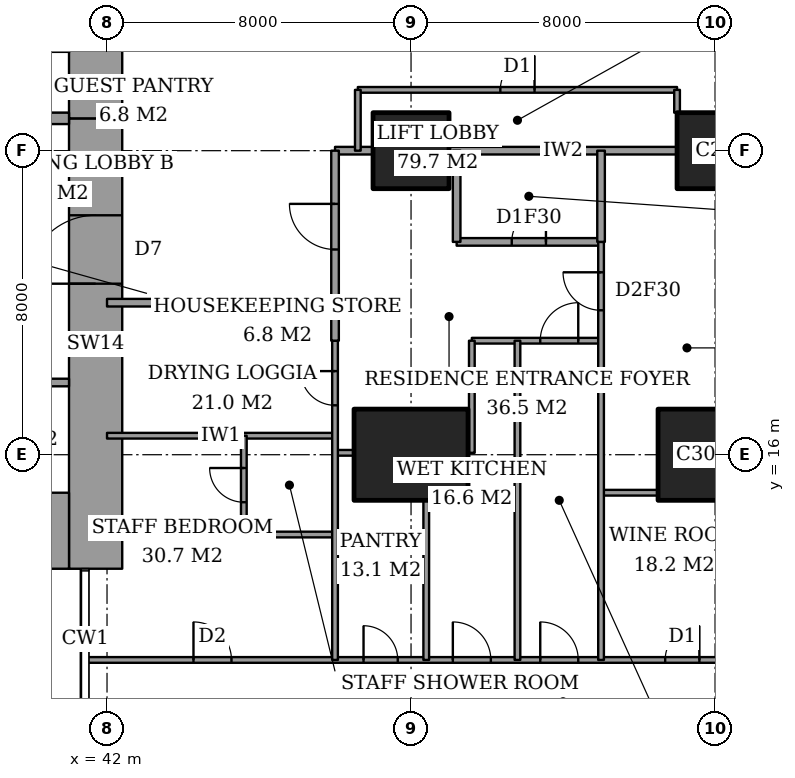
"""IFC4 building model, lengths in metres.
Left out: names, types, materials, properties, quantities, classifications, styles, units other than length and angle.
Written with IfcOpenShell. Run it as: python <this file> out.ifc"""

import sys

from ifc_helpers import new_model, si_unit, direction, frame, frame_2d, origin, origin_2d, place, context, subcontext, project, spatial, rectangle, extrude, element, fill, save


model = new_model("IFC4")
c1 = context("Model", 3, precision=1e-05, world=origin(), true_north=direction((0.0, 1.0)))
c2 = subcontext(c1, "Body", "Model", "MODEL_VIEW")
j1 = project(units=[si_unit("LENGTHUNIT", "METRE"), si_unit("PLANEANGLEUNIT", "RADIAN")], contexts=[c1])
p1 = place(None, origin())
s1 = spatial("IfcSite", under=j1, at=p1, CompositionType="ELEMENT")
p2 = place(p1, origin())
s2 = spatial("IfcBuilding", under=s1, at=p2, CompositionType="ELEMENT")
p3 = place(p2, frame((0.0, 0.0, 139.4)))
s3 = spatial("IfcBuildingStorey", under=s2, at=p3, CompositionType="ELEMENT", Elevation=139.4)
p4 = place(p3, frame((50.0, 16.0, 0.0), z_axis=(0.0, 0.0, 1.0), x_axis=(1.0, 0.0, 0.0)))
e1 = element("IfcColumn", 1, at=p4, inside=s3, PredefinedType="COLUMN", context=c2, shape_type="SweptSolid", body=[
    extrude(rectangle(XDim=3.0, YDim=2.4, at=origin_2d()), origin(), (0.0, 0.0, 1.0), 3.6),
])
p5 = place(p3, frame((50.0, 24.0, 0.0), z_axis=(0.0, 0.0, 1.0), x_axis=(1.0, 0.0, 0.0)))
e2 = element("IfcColumn", 2, at=p5, inside=s3, PredefinedType="COLUMN", context=c2, shape_type="SweptSolid", body=[
    extrude(rectangle(XDim=2.0, YDim=2.0, at=origin_2d()), origin(), (0.0, 0.0, 1.0), 3.6),
])
p6 = place(p3, frame((58.0, 16.0, 0.0), z_axis=(0.0, 0.0, 1.0), x_axis=(1.0, 0.0, 0.0)))
e3 = element("IfcColumn", 3, at=p6, inside=s3, PredefinedType="COLUMN", context=c2, shape_type="SweptSolid", body=[
    extrude(rectangle(XDim=3.0, YDim=2.4, at=origin_2d()), origin(), (0.0, 0.0, 1.0), 3.6),
])
p7 = place(p3, frame((58.0, 24.0, 0.0), z_axis=(0.0, 0.0, 1.0), x_axis=(1.0, 0.0, 0.0)))
e4 = element("IfcColumn", 4, at=p7, inside=s3, PredefinedType="COLUMN", context=c2, shape_type="SweptSolid", body=[
    extrude(rectangle(XDim=2.0, YDim=2.0, at=origin_2d()), origin(), (0.0, 0.0, 1.0), 3.6),
])
p8 = place(p3, frame((37.85, 14.0, 0.0), z_axis=(0.0, 0.0, 1.0), x_axis=(1.0, 0.0, 0.0)))
e5 = element("IfcWall", 5, at=p8, inside=s3, PredefinedType="SHEAR", context=c2, shape_type="SweptSolid", body=[
    extrude(rectangle(XDim=3.15, YDim=2.0, at=frame_2d((1.575, 0.0))), origin(), (0.0, 0.0, 1.0), 3.6),
])
p9 = place(p3, frame((41.7, 13.0, 0.0), z_axis=(0.0, 0.0, 1.0), x_axis=(0.0, 1.0, 0.0)))
e6 = element("IfcWall", 6, at=p9, inside=s3, PredefinedType="SHEAR", context=c2, shape_type="SweptSolid", body=[
    extrude(rectangle(XDim=11.85, YDim=1.4, at=frame_2d((5.925, 0.0))), origin(), (0.0, 0.0, 1.0), 3.6),
])
p10 = place(p9, frame((7.5, 0.0, 0.0)))
e7 = element("IfcOpeningElement", 7, at=p10, cuts=e6, PredefinedType="OPENING", context=c2, shape_type="SweptSolid", body=[
    extrude(rectangle(XDim=1.8, YDim=2.4, at=frame_2d((0.9, 1.2))), frame((0.0, 0.71, 0.0), z_axis=(0.0, -1.0, 0.0), x_axis=(1.0, 0.0, 0.0)), (0.0, 0.0, 1.0), 1.42),
])
p11 = place(p3, frame((41.7, 24.85, 0.0), z_axis=(0.0, 0.0, 1.0), x_axis=(0.0, 1.0, 0.0)))
e8 = element("IfcWall", 8, at=p11, inside=s3, PredefinedType="SHEAR", context=c2, shape_type="SweptSolid", body=[
    extrude(rectangle(XDim=10.15, YDim=1.4, at=frame_2d((5.075, 0.0))), origin(), (0.0, 0.0, 1.0), 3.6),
])
p12 = place(p3, frame((37.85, 24.85, 0.0), z_axis=(0.0, 0.0, 1.0), x_axis=(1.0, 0.0, 0.0)))
e9 = element("IfcWall", 9, at=p12, inside=s3, PredefinedType="SHEAR", context=c2, shape_type="SweptSolid", body=[
    extrude(rectangle(XDim=3.15, YDim=0.3, at=frame_2d((1.575, 0.0))), origin(), (0.0, 0.0, 1.0), 3.6),
])
p13 = place(p12, frame((0.95, 0.0, 0.0)))
e10 = element("IfcOpeningElement", 10, at=p13, cuts=e9, PredefinedType="OPENING", context=c2, shape_type="SweptSolid", body=[
    extrude(rectangle(XDim=1.0, YDim=2.1, at=frame_2d((0.5, 1.05))), frame((0.0, 0.16, 0.0), z_axis=(0.0, -1.0, 0.0), x_axis=(1.0, 0.0, 0.0)), (0.0, 0.0, 1.0), 0.32),
])
p14 = place(p3, frame((41.439, 10.6, 0.0), z_axis=(0.0, 0.0, 1.0), x_axis=(1.0, 0.0, 0.0)))
e11 = element("IfcWall", 11, at=p14, inside=s3, PredefinedType="PARTITIONING", context=c2, shape_type="SweptSolid", body=[
    extrude(rectangle(XDim=25.011, YDim=0.15, at=frame_2d((12.505, 0.0))), origin(), (0.0, 0.0, 1.0), 3.35),
])
p15 = place(p14, frame((11.961, 0.0, 0.0)))
e12 = element("IfcOpeningElement", 12, at=p15, cuts=e11, PredefinedType="OPENING", context=c2, shape_type="SweptSolid", body=[
    extrude(rectangle(XDim=1.0, YDim=2.1, at=frame_2d((0.5, 1.05))), frame((0.0, 0.085, 0.0), z_axis=(0.0, -1.0, 0.0), x_axis=(1.0, 0.0, 0.0)), (0.0, 0.0, 1.0), 0.17),
])
p16 = place(p14, frame((20.924, 0.0, 0.0)))
e13 = element("IfcOpeningElement", 13, at=p16, cuts=e11, PredefinedType="OPENING", context=c2, shape_type="SweptSolid", body=[
    extrude(rectangle(XDim=1.0, YDim=2.1, at=frame_2d((0.5, 1.05))), frame((0.0, 0.085, 0.0), z_axis=(0.0, -1.0, 0.0), x_axis=(1.0, 0.0, 0.0)), (0.0, 0.0, 1.0), 0.17),
])
p17 = place(p14, frame((15.249, 0.0, 0.0)))
e14 = element("IfcOpeningElement", 14, at=p17, cuts=e11, PredefinedType="OPENING", context=c2, shape_type="SweptSolid", body=[
    extrude(rectangle(XDim=0.9, YDim=2.1, at=frame_2d((0.45, 1.05))), frame((0.0, 0.085, 0.0), z_axis=(0.0, -1.0, 0.0), x_axis=(1.0, 0.0, 0.0)), (0.0, 0.0, 1.0), 0.17),
])
p18 = place(p14, frame((9.661, 0.0, 0.0)))
e15 = element("IfcOpeningElement", 15, at=p18, cuts=e11, PredefinedType="OPENING", context=c2, shape_type="SweptSolid", body=[
    extrude(rectangle(XDim=1.0, YDim=2.1, at=frame_2d((0.5, 1.05))), frame((0.0, 0.085, 0.0), z_axis=(0.0, -1.0, 0.0), x_axis=(1.0, 0.0, 0.0)), (0.0, 0.0, 1.0), 0.17),
])
p19 = place(p14, frame((7.311, 0.0, 0.0)))
e16 = element("IfcOpeningElement", 16, at=p19, cuts=e11, PredefinedType="OPENING", context=c2, shape_type="SweptSolid", body=[
    extrude(rectangle(XDim=0.9, YDim=2.1, at=frame_2d((0.45, 1.05))), frame((0.0, 0.085, 0.0), z_axis=(0.0, -1.0, 0.0), x_axis=(1.0, 0.0, 0.0)), (0.0, 0.0, 1.0), 0.17),
])
p20 = place(p14, frame((2.836, 0.0, 0.0)))
e17 = element("IfcOpeningElement", 17, at=p20, cuts=e11, PredefinedType="OPENING", context=c2, shape_type="SweptSolid", body=[
    extrude(rectangle(XDim=1.0, YDim=2.1, at=frame_2d((0.5, 1.05))), frame((0.0, 0.085, 0.0), z_axis=(0.0, -1.0, 0.0), x_axis=(1.0, 0.0, 0.0)), (0.0, 0.0, 1.0), 0.17),
])
p21 = place(p3, frame((45.6, 13.9, 0.0), z_axis=(0.0, 0.0, 1.0), x_axis=(1.0, 0.0, 0.0)))
e18 = element("IfcWall", 18, at=p21, inside=s3, PredefinedType="PARTITIONING", context=c2, shape_type="SweptSolid", body=[
    extrude(rectangle(XDim=2.4, YDim=0.15, at=frame_2d((1.2, 0.0))), origin(), (0.0, 0.0, 1.0), 3.35),
])
p22 = place(p3, frame((55.0, 15.0, 0.0), z_axis=(0.0, 0.0, 1.0), x_axis=(1.0, 0.0, 0.0)))
e19 = element("IfcWall", 19, at=p22, inside=s3, PredefinedType="PARTITIONING", context=c2, shape_type="SweptSolid", body=[
    extrude(rectangle(XDim=1.5, YDim=0.15, at=frame_2d((0.75, 0.0))), origin(), (0.0, 0.0, 1.0), 3.35),
])
p23 = place(p3, frame((48.0, 16.05, 0.0), z_axis=(0.0, 0.0, 1.0), x_axis=(1.0, 0.0, 0.0)))
e20 = element("IfcWall", 20, at=p23, inside=s3, PredefinedType="PARTITIONING", context=c2, shape_type="SweptSolid", body=[
    extrude(rectangle(XDim=0.5, YDim=0.15, at=frame_2d((0.25, 0.0))), origin(), (0.0, 0.0, 1.0), 2.634),
])
p24 = place(p3, frame((42.0, 16.5, 0.0), z_axis=(0.0, 0.0, 1.0), x_axis=(1.0, 0.0, 0.0)))
e21 = element("IfcWall", 21, at=p24, inside=s3, PredefinedType="PARTITIONING", context=c2, shape_type="SweptSolid", body=[
    extrude(rectangle(XDim=6.0, YDim=0.15, at=frame_2d((3.0, 0.0))), origin(), (0.0, 0.0, 1.0), 3.35),
])
p25 = place(p3, frame((51.6, 19.0, 0.0), z_axis=(0.0, 0.0, 1.0), x_axis=(1.0, 0.0, 0.0)))
e22 = element("IfcWall", 22, at=p25, inside=s3, PredefinedType="PARTITIONING", context=c2, shape_type="SweptSolid", body=[
    extrude(rectangle(XDim=3.4, YDim=0.15, at=frame_2d((1.7, 0.0))), origin(), (0.0, 0.0, 1.0), 3.35),
])
p26 = place(p25, frame((1.8, 0.0, 0.0)))
e23 = element("IfcOpeningElement", 23, at=p26, cuts=e22, PredefinedType="OPENING", context=c2, shape_type="SweptSolid", body=[
    extrude(rectangle(XDim=1.0, YDim=2.1, at=frame_2d((0.5, 1.05))), frame((0.0, 0.085, 0.0), z_axis=(0.0, -1.0, 0.0), x_axis=(1.0, 0.0, 0.0)), (0.0, 0.0, 1.0), 0.17),
])
p27 = place(p3, frame((42.0, 20.0, 0.0), z_axis=(0.0, 0.0, 1.0), x_axis=(1.0, 0.0, 0.0)))
e24 = element("IfcWall", 24, at=p27, inside=s3, PredefinedType="PARTITIONING", context=c2, shape_type="SweptSolid", body=[
    extrude(rectangle(XDim=6.0, YDim=0.2, at=frame_2d((3.0, 0.0))), origin(), (0.0, 0.0, 1.0), 3.35),
])
p28 = place(p3, frame((51.2, 21.6, 0.0), z_axis=(0.0, 0.0, 1.0), x_axis=(1.0, 0.0, 0.0)))
e25 = element("IfcWall", 25, at=p28, inside=s3, PredefinedType="PARTITIONING", context=c2, shape_type="SweptSolid", body=[
    extrude(rectangle(XDim=3.8, YDim=0.2, at=frame_2d((1.9, 0.0))), origin(), (0.0, 0.0, 1.0), 3.35),
])
p29 = place(p28, frame((1.45, 0.0, 0.0)))
e26 = element("IfcOpeningElement", 26, at=p29, cuts=e25, PredefinedType="OPENING", context=c2, shape_type="SweptSolid", body=[
    extrude(rectangle(XDim=0.9, YDim=2.1, at=frame_2d((0.45, 1.05))), frame((0.0, 0.11, 0.0), z_axis=(0.0, -1.0, 0.0), x_axis=(1.0, 0.0, 0.0)), (0.0, 0.0, 1.0), 0.22),
])
p30 = place(p3, frame((48.0, 24.0, 0.0), z_axis=(0.0, 0.0, 1.0), x_axis=(1.0, 0.0, 0.0)))
e27 = element("IfcWall", 27, at=p30, inside=s3, PredefinedType="PARTITIONING", context=c2, shape_type="SweptSolid", body=[
    extrude(rectangle(XDim=1.0, YDim=0.2, at=frame_2d((0.5, 0.0))), origin(), (0.0, 0.0, 1.0), 3.35),
])
p31 = place(p3, frame((51.0, 24.0, 0.0), z_axis=(0.0, 0.0, 1.0), x_axis=(1.0, 0.0, 0.0)))
e28 = element("IfcWall", 28, at=p31, inside=s3, PredefinedType="PARTITIONING", context=c2, shape_type="SweptSolid", body=[
    extrude(rectangle(XDim=6.0, YDim=0.2, at=frame_2d((3.0, 0.0))), origin(), (0.0, 0.0, 1.0), 3.35),
])
p32 = place(p3, frame((48.6, 25.6, 0.0), z_axis=(0.0, 0.0, 1.0), x_axis=(1.0, 0.0, 0.0)))
e29 = element("IfcWall", 29, at=p32, inside=s3, PredefinedType="PARTITIONING", context=c2, shape_type="SweptSolid", body=[
    extrude(rectangle(XDim=8.4, YDim=0.15, at=frame_2d((4.2, 0.0))), origin(), (0.0, 0.0, 1.0), 3.35),
])
p33 = place(p32, frame((3.75, 0.0, 0.0)))
e30 = element("IfcOpeningElement", 30, at=p33, cuts=e29, PredefinedType="OPENING", context=c2, shape_type="SweptSolid", body=[
    extrude(rectangle(XDim=0.9, YDim=2.1, at=frame_2d((0.45, 1.05))), frame((0.0, 0.085, 0.0), z_axis=(0.0, -1.0, 0.0), x_axis=(1.0, 0.0, 0.0)), (0.0, 0.0, 1.0), 0.17),
])
p34 = place(p3, frame((45.6, 13.9, 0.0), z_axis=(0.0, 0.0, 1.0), x_axis=(0.0, 1.0, 0.0)))
e31 = element("IfcWall", 31, at=p34, inside=s3, PredefinedType="PARTITIONING", context=c2, shape_type="SweptSolid", body=[
    extrude(rectangle(XDim=2.6, YDim=0.15, at=frame_2d((1.3, 0.0))), origin(), (0.0, 0.0, 1.0), 3.35),
])
p35 = place(p34, frame((0.85, 0.0, 0.0)))
e32 = element("IfcOpeningElement", 32, at=p35, cuts=e31, PredefinedType="OPENING", context=c2, shape_type="SweptSolid", body=[
    extrude(rectangle(XDim=0.9, YDim=2.1, at=frame_2d((0.45, 1.05))), frame((0.0, 0.085, 0.0), z_axis=(0.0, -1.0, 0.0), x_axis=(1.0, 0.0, 0.0)), (0.0, 0.0, 1.0), 0.17),
])
p36 = place(p3, frame((48.0, 19.0, 0.0), z_axis=(0.0, 0.0, 1.0), x_axis=(0.0, 1.0, 0.0)))
e33 = element("IfcWall", 33, at=p36, inside=s3, PredefinedType="PARTITIONING", context=c2, shape_type="SweptSolid", body=[
    extrude(rectangle(XDim=5.0, YDim=0.2, at=frame_2d((2.5, 0.0))), origin(), (0.0, 0.0, 1.0), 3.35),
])
p37 = place(p36, frame((2.4, 0.0, 0.0)))
e34 = element("IfcOpeningElement", 34, at=p37, cuts=e33, PredefinedType="OPENING", context=c2, shape_type="SweptSolid", body=[
    extrude(rectangle(XDim=1.2, YDim=2.4, at=frame_2d((0.6, 1.2))), frame((0.0, 0.11, 0.0), z_axis=(0.0, -1.0, 0.0), x_axis=(1.0, 0.0, 0.0)), (0.0, 0.0, 1.0), 0.22),
])
p38 = place(p3, frame((48.0, 10.6, 0.0), z_axis=(0.0, 0.0, 1.0), x_axis=(0.0, 1.0, 0.0)))
e35 = element("IfcWall", 35, at=p38, inside=s3, PredefinedType="PARTITIONING", context=c2, shape_type="SweptSolid", body=[
    extrude(rectangle(XDim=8.4, YDim=0.15, at=frame_2d((4.2, 0.0))), origin(), (0.0, 0.0, 1.0), 3.35),
])
p39 = place(p38, frame((6.7, 0.0, 0.0)))
e36 = element("IfcOpeningElement", 36, at=p39, cuts=e35, PredefinedType="OPENING", context=c2, shape_type="SweptSolid", body=[
    extrude(rectangle(XDim=0.9, YDim=2.1, at=frame_2d((0.45, 1.05))), frame((0.0, 0.085, 0.0), z_axis=(0.0, -1.0, 0.0), x_axis=(1.0, 0.0, 0.0)), (0.0, 0.0, 1.0), 0.17),
])
p40 = place(p3, frame((48.6, 24.0, 0.0), z_axis=(0.0, 0.0, 1.0), x_axis=(0.0, 1.0, 0.0)))
e37 = element("IfcWall", 37, at=p40, inside=s3, PredefinedType="PARTITIONING", context=c2, shape_type="SweptSolid", body=[
    extrude(rectangle(XDim=1.6, YDim=0.15, at=frame_2d((0.8, 0.0))), origin(), (0.0, 0.0, 1.0), 3.35),
])
p41 = place(p3, frame((50.4, 10.6, 0.0), z_axis=(0.0, 0.0, 1.0), x_axis=(0.0, 1.0, 0.0)))
e38 = element("IfcWall", 38, at=p41, inside=s3, PredefinedType="PARTITIONING", context=c2, shape_type="SweptSolid", body=[
    extrude(rectangle(XDim=4.2, YDim=0.15, at=frame_2d((2.1, 0.0))), origin(), (0.0, 0.0, 1.0), 3.35),
])
p42 = place(p3, frame((51.2, 21.6, 0.0), z_axis=(0.0, 0.0, 1.0), x_axis=(0.0, 1.0, 0.0)))
e39 = element("IfcWall", 39, at=p42, inside=s3, PredefinedType="PARTITIONING", context=c2, shape_type="SweptSolid", body=[
    extrude(rectangle(XDim=2.4, YDim=0.2, at=frame_2d((1.2, 0.0))), origin(), (0.0, 0.0, 1.0), 3.35),
])
p43 = place(p3, frame((51.6, 16.05, 0.0), z_axis=(0.0, 0.0, 1.0), x_axis=(0.0, 1.0, 0.0)))
e40 = element("IfcWall", 40, at=p43, inside=s3, PredefinedType="PARTITIONING", context=c2, shape_type="SweptSolid", body=[
    extrude(rectangle(XDim=2.95, YDim=0.15, at=frame_2d((1.475, 0.0))), origin(), (0.0, 0.0, 1.0), 3.35),
])
p44 = place(p3, frame((52.8, 10.6, 0.0), z_axis=(0.0, 0.0, 1.0), x_axis=(0.0, 1.0, 0.0)))
e41 = element("IfcWall", 41, at=p44, inside=s3, PredefinedType="PARTITIONING", context=c2, shape_type="SweptSolid", body=[
    extrude(rectangle(XDim=8.4, YDim=0.15, at=frame_2d((4.2, 0.0))), origin(), (0.0, 0.0, 1.0), 3.35),
])
p45 = place(p3, frame((55.0, 21.6, 0.0), z_axis=(0.0, 0.0, 1.0), x_axis=(0.0, 1.0, 0.0)))
e42 = element("IfcWall", 42, at=p45, inside=s3, PredefinedType="PARTITIONING", context=c2, shape_type="SweptSolid", body=[
    extrude(rectangle(XDim=2.4, YDim=0.2, at=frame_2d((1.2, 0.0))), origin(), (0.0, 0.0, 1.0), 3.35),
])
p46 = place(p3, frame((55.0, 10.6, 0.0), z_axis=(0.0, 0.0, 1.0), x_axis=(0.0, 1.0, 0.0)))
e43 = element("IfcWall", 43, at=p46, inside=s3, PredefinedType="PARTITIONING", context=c2, shape_type="SweptSolid", body=[
    extrude(rectangle(XDim=11.0, YDim=0.15, at=frame_2d((5.5, 0.0))), origin(), (0.0, 0.0, 1.0), 3.35),
])
p47 = place(p46, frame((9.2, 0.0, 0.0)))
e44 = element("IfcOpeningElement", 44, at=p47, cuts=e43, PredefinedType="OPENING", context=c2, shape_type="SweptSolid", body=[
    extrude(rectangle(XDim=1.0, YDim=2.1, at=frame_2d((0.5, 1.05))), frame((0.0, 0.085, 0.0), z_axis=(0.0, -1.0, 0.0), x_axis=(1.0, 0.0, 0.0)), (0.0, 0.0, 1.0), 0.17),
])
p48 = place(p3, frame((57.0, 25.0, 0.0), z_axis=(0.0, 0.0, 1.0), x_axis=(0.0, 1.0, 0.0)))
e45 = element("IfcWall", 45, at=p48, inside=s3, PredefinedType="PARTITIONING", context=c2, shape_type="SweptSolid", body=[
    extrude(rectangle(XDim=0.6, YDim=0.15, at=frame_2d((0.3, 0.0))), origin(), (0.0, 0.0, 1.0), 3.35),
])
p49 = place(p3, frame((28.3, 17.9, 0.0), z_axis=(0.0, 0.0, 1.0), x_axis=(1.0, 0.0, 0.0)))
e46 = element("IfcWall", 46, at=p49, inside=s3, PredefinedType="PARTITIONING", context=c2, shape_type="SweptSolid", body=[
    extrude(rectangle(XDim=12.7, YDim=0.2, at=frame_2d((6.35, 0.0))), origin(), (0.0, 0.0, 1.0), 3.6),
])
p50 = place(p49, frame((0.95, 0.0, 0.0)))
e47 = element("IfcOpeningElement", 47, at=p50, cuts=e46, PredefinedType="OPENING", context=c2, shape_type="SweptSolid", body=[
    extrude(rectangle(XDim=1.1, YDim=2.1, at=frame_2d((0.55, 1.05))), frame((0.0, 0.11, 0.0), z_axis=(0.0, -1.0, 0.0), x_axis=(1.0, 0.0, 0.0)), (0.0, 0.0, 1.0), 0.22),
])
p51 = place(p49, frame((4.15, 0.0, 0.0)))
e48 = element("IfcOpeningElement", 48, at=p51, cuts=e46, PredefinedType="OPENING", context=c2, shape_type="SweptSolid", body=[
    extrude(rectangle(XDim=1.1, YDim=2.1, at=frame_2d((0.55, 1.05))), frame((0.0, 0.11, 0.0), z_axis=(0.0, -1.0, 0.0), x_axis=(1.0, 0.0, 0.0)), (0.0, 0.0, 1.0), 0.22),
])
p52 = place(p49, frame((7.35, 0.0, 0.0)))
e49 = element("IfcOpeningElement", 49, at=p52, cuts=e46, PredefinedType="OPENING", context=c2, shape_type="SweptSolid", body=[
    extrude(rectangle(XDim=1.1, YDim=2.1, at=frame_2d((0.55, 1.05))), frame((0.0, 0.11, 0.0), z_axis=(0.0, -1.0, 0.0), x_axis=(1.0, 0.0, 0.0)), (0.0, 0.0, 1.0), 0.22),
])
p53 = place(p49, frame((10.6, 0.0, 0.0)))
e50 = element("IfcOpeningElement", 50, at=p53, cuts=e46, PredefinedType="OPENING", context=c2, shape_type="SweptSolid", body=[
    extrude(rectangle(XDim=1.2, YDim=2.1, at=frame_2d((0.6, 1.05))), frame((0.0, 0.11, 0.0), z_axis=(0.0, -1.0, 0.0), x_axis=(1.0, 0.0, 0.0)), (0.0, 0.0, 1.0), 0.22),
])
p54 = place(p15, origin())
e51 = element("IfcDoor", 51, at=p54, inside=s3, OperationType="SINGLE_SWING_RIGHT", PredefinedType="DOOR", context=c2, shape_type="SweptSolid", body=[
    extrude(rectangle(XDim=1.0, YDim=2.1, at=frame_2d((0.5, 1.05))), frame((0.0, 0.025, 0.0), z_axis=(0.0, -1.0, 0.0), x_axis=(1.0, 0.0, 0.0)), (0.0, 0.0, 1.0), 0.05),
])
fill(e12, e51)
p55 = place(p17, origin())
e52 = element("IfcDoor", 52, at=p55, inside=s3, OperationType="SINGLE_SWING_LEFT", PredefinedType="DOOR", context=c2, shape_type="SweptSolid", body=[
    extrude(rectangle(XDim=0.9, YDim=2.1, at=frame_2d((0.45, 1.05))), frame((0.0, 0.025, 0.0), z_axis=(0.0, -1.0, 0.0), x_axis=(1.0, 0.0, 0.0)), (0.0, 0.0, 1.0), 0.05),
])
fill(e14, e52)
p56 = place(p47, origin())
e53 = element("IfcDoor", 53, at=p56, inside=s3, OperationType="SINGLE_SWING_LEFT", PredefinedType="DOOR", context=c2, shape_type="SweptSolid", body=[
    extrude(rectangle(XDim=1.0, YDim=2.1, at=frame_2d((0.5, 1.05))), frame((0.0, 0.025, 0.0), z_axis=(0.0, -1.0, 0.0), x_axis=(1.0, 0.0, 0.0)), (0.0, 0.0, 1.0), 0.05),
])
fill(e44, e53)
p57 = place(p29, origin())
e54 = element("IfcDoor", 54, at=p57, inside=s3, OperationType="SINGLE_SWING_LEFT", PredefinedType="DOOR", context=c2, shape_type="SweptSolid", body=[
    extrude(rectangle(XDim=0.9, YDim=2.1, at=frame_2d((0.45, 1.05))), frame((0.0, 0.025, 0.0), z_axis=(0.0, -1.0, 0.0), x_axis=(1.0, 0.0, 0.0)), (0.0, 0.0, 1.0), 0.05),
])
fill(e26, e54)
p58 = place(p37, origin())
e55 = element("IfcDoor", 55, at=p58, inside=s3, OperationType="SINGLE_SWING_LEFT", PredefinedType="DOOR", context=c2, shape_type="SweptSolid", body=[
    extrude(rectangle(XDim=1.2, YDim=2.4, at=frame_2d((0.6, 1.2))), frame((0.0, 0.025, 0.0), z_axis=(0.0, -1.0, 0.0), x_axis=(1.0, 0.0, 0.0)), (0.0, 0.0, 1.0), 0.05),
])
fill(e34, e55)
p59 = place(p26, origin())
e56 = element("IfcDoor", 56, at=p59, inside=s3, OperationType="SINGLE_SWING_LEFT", PredefinedType="DOOR", context=c2, shape_type="SweptSolid", body=[
    extrude(rectangle(XDim=1.0, YDim=2.1, at=frame_2d((0.5, 1.05))), frame((0.0, 0.025, 0.0), z_axis=(0.0, -1.0, 0.0), x_axis=(1.0, 0.0, 0.0)), (0.0, 0.0, 1.0), 0.05),
])
fill(e23, e56)
p60 = place(p18, origin())
e57 = element("IfcDoor", 57, at=p60, inside=s3, OperationType="SINGLE_SWING_RIGHT", PredefinedType="DOOR", context=c2, shape_type="SweptSolid", body=[
    extrude(rectangle(XDim=1.0, YDim=2.1, at=frame_2d((0.5, 1.05))), frame((0.0, 0.025, 0.0), z_axis=(0.0, -1.0, 0.0), x_axis=(1.0, 0.0, 0.0)), (0.0, 0.0, 1.0), 0.05),
])
fill(e15, e57)
p61 = place(p19, origin())
e58 = element("IfcDoor", 58, at=p61, inside=s3, OperationType="SINGLE_SWING_RIGHT", PredefinedType="DOOR", context=c2, shape_type="SweptSolid", body=[
    extrude(rectangle(XDim=0.9, YDim=2.1, at=frame_2d((0.45, 1.05))), frame((0.0, 0.025, 0.0), z_axis=(0.0, -1.0, 0.0), x_axis=(1.0, 0.0, 0.0)), (0.0, 0.0, 1.0), 0.05),
])
fill(e16, e58)
p62 = place(p35, origin())
e59 = element("IfcDoor", 59, at=p62, inside=s3, OperationType="SINGLE_SWING_LEFT", PredefinedType="DOOR", context=c2, shape_type="SweptSolid", body=[
    extrude(rectangle(XDim=0.9, YDim=2.1, at=frame_2d((0.45, 1.05))), frame((0.0, 0.025, 0.0), z_axis=(0.0, -1.0, 0.0), x_axis=(1.0, 0.0, 0.0)), (0.0, 0.0, 1.0), 0.05),
])
fill(e32, e59)
p63 = place(p20, origin())
e60 = element("IfcDoor", 60, at=p63, inside=s3, OperationType="SINGLE_SWING_RIGHT", PredefinedType="DOOR", context=c2, shape_type="SweptSolid", body=[
    extrude(rectangle(XDim=1.0, YDim=2.1, at=frame_2d((0.5, 1.05))), frame((0.0, 0.025, 0.0), z_axis=(0.0, -1.0, 0.0), x_axis=(1.0, 0.0, 0.0)), (0.0, 0.0, 1.0), 0.05),
])
fill(e17, e60)
p64 = place(p39, origin())
e61 = element("IfcDoor", 61, at=p64, inside=s3, OperationType="SINGLE_SWING_LEFT", PredefinedType="DOOR", context=c2, shape_type="SweptSolid", body=[
    extrude(rectangle(XDim=0.9, YDim=2.1, at=frame_2d((0.45, 1.05))), frame((0.0, 0.025, 0.0), z_axis=(0.0, -1.0, 0.0), x_axis=(1.0, 0.0, 0.0)), (0.0, 0.0, 1.0), 0.05),
])
fill(e36, e61)
p65 = place(p33, origin())
e62 = element("IfcDoor", 62, at=p65, inside=s3, OperationType="SINGLE_SWING_LEFT", PredefinedType="DOOR", context=c2, shape_type="SweptSolid", body=[
    extrude(rectangle(XDim=0.9, YDim=2.1, at=frame_2d((0.45, 1.05))), frame((0.0, 0.025, 0.0), z_axis=(0.0, -1.0, 0.0), x_axis=(1.0, 0.0, 0.0)), (0.0, 0.0, 1.0), 0.05),
])
fill(e30, e62)
p66 = place(p10, origin())
e63 = element("IfcDoor", 63, at=p66, inside=s3, OperationType="DOUBLE_DOOR_DOUBLE_SWING", PredefinedType="DOOR", context=c2, shape_type="SweptSolid", body=[
    extrude(rectangle(XDim=1.8, YDim=2.4, at=frame_2d((0.9, 1.2))), frame((0.0, 0.025, 0.0), z_axis=(0.0, -1.0, 0.0), x_axis=(1.0, 0.0, 0.0)), (0.0, 0.0, 1.0), 0.05),
])
fill(e7, e63)
save(model, sys.argv[1])
